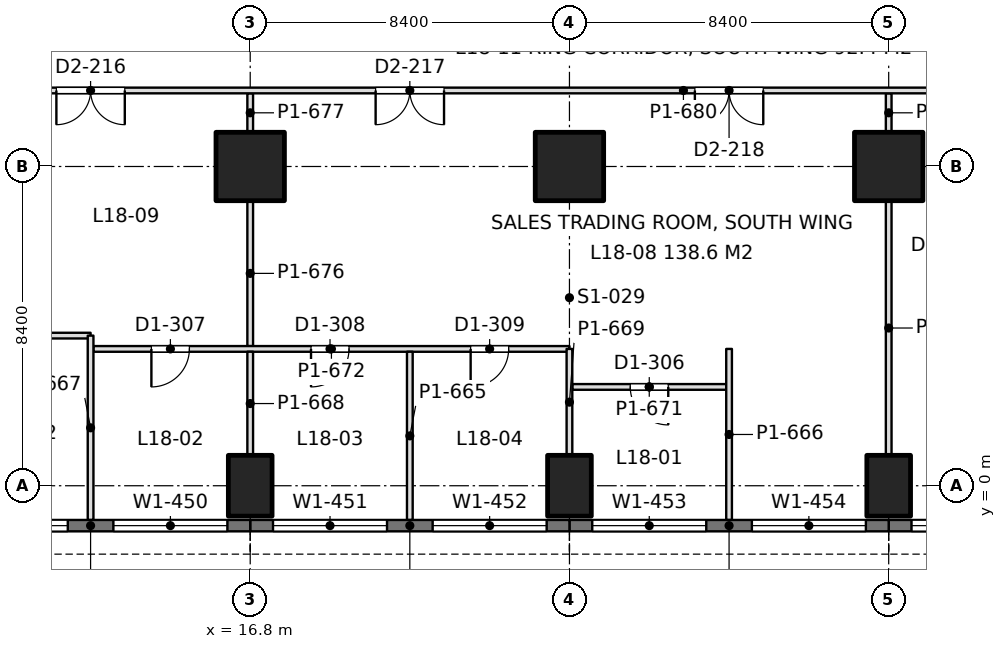
"""IFC4 building model, lengths in metres.
Left out: names, types, materials, properties, quantities, classifications, styles, units other than length and angle.
Written with IfcOpenShell. Run it as: python <this file> out.ifc"""

import sys

from ifc_helpers import new_model, si_unit, direction, frame, frame_2d, origin, origin_2d, place, context, subcontext, project, spatial, rectangle, extrude, element, fill, save


model = new_model("IFC4")
c1 = context("Model", 3, precision=1e-05, world=origin(), true_north=direction((0.0, 1.0)))
c2 = subcontext(c1, "Body", "Model", "MODEL_VIEW")
j1 = project(units=[si_unit("LENGTHUNIT", "METRE"), si_unit("PLANEANGLEUNIT", "RADIAN")], contexts=[c1])
p1 = place(None, origin())
s1 = spatial("IfcSite", under=j1, at=p1, CompositionType="ELEMENT")
p2 = place(p1, origin())
s2 = spatial("IfcBuilding", under=s1, at=p2, CompositionType="ELEMENT")
p3 = place(p2, frame((0.0, 0.0, 81.9)))
s3 = spatial("IfcBuildingStorey", under=s2, at=p3, CompositionType="ELEMENT", Elevation=81.9)
p4 = place(p3, frame((16.8, 0.0, 0.0), z_axis=(0.0, 0.0, 1.0), x_axis=(1.0, 0.0, 0.0)))
e1 = element("IfcColumn", 1, at=p4, inside=s3, PredefinedType="COLUMN", context=c2, shape_type="SweptSolid", body=[
    extrude(rectangle(XDim=1.15, YDim=1.6, at=origin_2d()), origin(), (0.0, 0.0, 1.0), 4.5),
])
p5 = place(p3, frame((16.8, 8.4, 0.0), z_axis=(0.0, 0.0, 1.0), x_axis=(1.0, 0.0, 0.0)))
e2 = element("IfcColumn", 2, at=p5, inside=s3, PredefinedType="COLUMN", context=c2, shape_type="SweptSolid", body=[
    extrude(rectangle(XDim=1.8, YDim=1.8, at=origin_2d()), origin(), (0.0, 0.0, 1.0), 4.5),
])
p6 = place(p3, frame((25.2, 0.0, 0.0), z_axis=(0.0, 0.0, 1.0), x_axis=(1.0, 0.0, 0.0)))
e3 = element("IfcColumn", 3, at=p6, inside=s3, PredefinedType="COLUMN", context=c2, shape_type="SweptSolid", body=[
    extrude(rectangle(XDim=1.15, YDim=1.6, at=origin_2d()), origin(), (0.0, 0.0, 1.0), 4.5),
])
p7 = place(p3, frame((25.2, 8.4, 0.0), z_axis=(0.0, 0.0, 1.0), x_axis=(1.0, 0.0, 0.0)))
e4 = element("IfcColumn", 4, at=p7, inside=s3, PredefinedType="COLUMN", context=c2, shape_type="SweptSolid", body=[
    extrude(rectangle(XDim=1.8, YDim=1.8, at=origin_2d()), origin(), (0.0, 0.0, 1.0), 4.5),
])
p8 = place(p3, frame((33.6, 0.0, 0.0), z_axis=(0.0, 0.0, 1.0), x_axis=(1.0, 0.0, 0.0)))
e5 = element("IfcColumn", 5, at=p8, inside=s3, PredefinedType="COLUMN", context=c2, shape_type="SweptSolid", body=[
    extrude(rectangle(XDim=1.15, YDim=1.6, at=origin_2d()), origin(), (0.0, 0.0, 1.0), 4.5),
])
p9 = place(p3, frame((33.6, 8.4, 0.0), z_axis=(0.0, 0.0, 1.0), x_axis=(1.0, 0.0, 0.0)))
e6 = element("IfcColumn", 6, at=p9, inside=s3, PredefinedType="COLUMN", context=c2, shape_type="SweptSolid", body=[
    extrude(rectangle(XDim=1.8, YDim=1.8, at=origin_2d()), origin(), (0.0, 0.0, 1.0), 4.5),
])
p10 = place(p3, frame((42.0, -1.05, 0.0), z_axis=(0.0, 0.0, 1.0), x_axis=(-1.0, 0.0, 0.0)))
e7 = element("IfcWall", 7, at=p10, inside=s3, PredefinedType="SOLIDWALL", context=c2, shape_type="SweptSolid", body=[
    extrude(rectangle(XDim=8.4, YDim=0.3, at=frame_2d((4.2, 0.0))), origin(), (0.0, 0.0, 1.0), 4.34),
])
p11 = place(p10, frame((0.6, 0.0, 0.9)))
e8 = element("IfcOpeningElement", 8, at=p11, cuts=e7, PredefinedType="OPENING", context=c2, shape_type="SweptSolid", body=[
    extrude(rectangle(XDim=3.0, YDim=1.9, at=frame_2d((1.5, 0.95))), frame((0.0, 0.16, 0.0), z_axis=(0.0, -1.0, 0.0), x_axis=(1.0, 0.0, 0.0)), (0.0, 0.0, 1.0), 0.32),
])
p12 = place(p10, frame((4.8, 0.0, 0.9)))
e9 = element("IfcOpeningElement", 9, at=p12, cuts=e7, PredefinedType="OPENING", context=c2, shape_type="SweptSolid", body=[
    extrude(rectangle(XDim=3.0, YDim=1.9, at=frame_2d((1.5, 0.95))), frame((0.0, 0.16, 0.0), z_axis=(0.0, -1.0, 0.0), x_axis=(1.0, 0.0, 0.0)), (0.0, 0.0, 1.0), 0.32),
])
p13 = place(p3, frame((33.6, -1.05, 0.0), z_axis=(0.0, 0.0, 1.0), x_axis=(-1.0, 0.0, 0.0)))
e10 = element("IfcWall", 10, at=p13, inside=s3, PredefinedType="SOLIDWALL", context=c2, shape_type="SweptSolid", body=[
    extrude(rectangle(XDim=8.4, YDim=0.3, at=frame_2d((4.2, 0.0))), origin(), (0.0, 0.0, 1.0), 4.34),
])
p14 = place(p13, frame((0.6, 0.0, 0.9)))
e11 = element("IfcOpeningElement", 11, at=p14, cuts=e10, PredefinedType="OPENING", context=c2, shape_type="SweptSolid", body=[
    extrude(rectangle(XDim=3.0, YDim=1.9, at=frame_2d((1.5, 0.95))), frame((0.0, 0.16, 0.0), z_axis=(0.0, -1.0, 0.0), x_axis=(1.0, 0.0, 0.0)), (0.0, 0.0, 1.0), 0.32),
])
p15 = place(p13, frame((4.8, 0.0, 0.9)))
e12 = element("IfcOpeningElement", 12, at=p15, cuts=e10, PredefinedType="OPENING", context=c2, shape_type="SweptSolid", body=[
    extrude(rectangle(XDim=3.0, YDim=1.9, at=frame_2d((1.5, 0.95))), frame((0.0, 0.16, 0.0), z_axis=(0.0, -1.0, 0.0), x_axis=(1.0, 0.0, 0.0)), (0.0, 0.0, 1.0), 0.32),
])
p16 = place(p3, frame((25.2, -1.05, 0.0), z_axis=(0.0, 0.0, 1.0), x_axis=(-1.0, 0.0, 0.0)))
e13 = element("IfcWall", 13, at=p16, inside=s3, PredefinedType="SOLIDWALL", context=c2, shape_type="SweptSolid", body=[
    extrude(rectangle(XDim=8.4, YDim=0.3, at=frame_2d((4.2, 0.0))), origin(), (0.0, 0.0, 1.0), 4.34),
])
p17 = place(p16, frame((0.6, 0.0, 0.9)))
e14 = element("IfcOpeningElement", 14, at=p17, cuts=e13, PredefinedType="OPENING", context=c2, shape_type="SweptSolid", body=[
    extrude(rectangle(XDim=3.0, YDim=1.9, at=frame_2d((1.5, 0.95))), frame((0.0, 0.16, 0.0), z_axis=(0.0, -1.0, 0.0), x_axis=(1.0, 0.0, 0.0)), (0.0, 0.0, 1.0), 0.32),
])
p18 = place(p16, frame((4.8, 0.0, 0.9)))
e15 = element("IfcOpeningElement", 15, at=p18, cuts=e13, PredefinedType="OPENING", context=c2, shape_type="SweptSolid", body=[
    extrude(rectangle(XDim=3.0, YDim=1.9, at=frame_2d((1.5, 0.95))), frame((0.0, 0.16, 0.0), z_axis=(0.0, -1.0, 0.0), x_axis=(1.0, 0.0, 0.0)), (0.0, 0.0, 1.0), 0.32),
])
p19 = place(p3, frame((16.8, -1.05, 0.0), z_axis=(0.0, 0.0, 1.0), x_axis=(-1.0, 0.0, 0.0)))
e16 = element("IfcWall", 16, at=p19, inside=s3, PredefinedType="SOLIDWALL", context=c2, shape_type="SweptSolid", body=[
    extrude(rectangle(XDim=8.4, YDim=0.3, at=frame_2d((4.2, 0.0))), origin(), (0.0, 0.0, 1.0), 4.34),
])
p20 = place(p19, frame((0.6, 0.0, 0.9)))
e17 = element("IfcOpeningElement", 17, at=p20, cuts=e16, PredefinedType="OPENING", context=c2, shape_type="SweptSolid", body=[
    extrude(rectangle(XDim=3.0, YDim=1.9, at=frame_2d((1.5, 0.95))), frame((0.0, 0.16, 0.0), z_axis=(0.0, -1.0, 0.0), x_axis=(1.0, 0.0, 0.0)), (0.0, 0.0, 1.0), 0.32),
])
p21 = place(p19, frame((4.8, 0.0, 0.9)))
e18 = element("IfcOpeningElement", 18, at=p21, cuts=e16, PredefinedType="OPENING", context=c2, shape_type="SweptSolid", body=[
    extrude(rectangle(XDim=3.0, YDim=1.9, at=frame_2d((1.5, 0.95))), frame((0.0, 0.16, 0.0), z_axis=(0.0, -1.0, 0.0), x_axis=(1.0, 0.0, 0.0)), (0.0, 0.0, 1.0), 0.32),
])
p22 = place(p3, frame((-0.902, 3.95, 0.0), z_axis=(0.0, 0.0, 1.0), x_axis=(1.0, 0.0, 0.0)))
e19 = element("IfcWall", 19, at=p22, inside=s3, PredefinedType="PARTITIONING", context=c2, shape_type="SweptSolid", body=[
    extrude(rectangle(XDim=13.502, YDim=0.15, at=frame_2d((6.751, 0.0))), origin(), (0.0, 0.0, 1.0), 3.74),
])
p23 = place(p22, frame((5.852, 0.0, 0.0)))
e20 = element("IfcOpeningElement", 20, at=p23, cuts=e19, PredefinedType="OPENING", context=c2, shape_type="SweptSolid", body=[
    extrude(rectangle(XDim=1.8, YDim=2.2, at=frame_2d((0.9, 1.1))), frame((0.0, 0.085, 0.0), z_axis=(0.0, -1.0, 0.0), x_axis=(1.0, 0.0, 0.0)), (0.0, 0.0, 1.0), 0.17),
])
p24 = place(p3, frame((25.274, 2.6, 0.0), z_axis=(0.0, 0.0, 1.0), x_axis=(1.0, 0.0, 0.0)))
e21 = element("IfcWall", 21, at=p24, inside=s3, PredefinedType="PARTITIONING", context=c2, shape_type="SweptSolid", body=[
    extrude(rectangle(XDim=4.052, YDim=0.15, at=frame_2d((2.026, 0.0))), origin(), (0.0, 0.0, 1.0), 3.74),
])
p25 = place(p24, frame((1.526, 0.0, 0.0)))
e22 = element("IfcOpeningElement", 22, at=p25, cuts=e21, PredefinedType="OPENING", context=c2, shape_type="SweptSolid", body=[
    extrude(rectangle(XDim=1.0, YDim=2.2, at=frame_2d((0.5, 1.1))), frame((0.0, 0.085, 0.0), z_axis=(0.0, -1.0, 0.0), x_axis=(1.0, 0.0, 0.0)), (0.0, 0.0, 1.0), 0.17),
])
p26 = place(p3, frame((12.674, 3.6, 0.0), z_axis=(0.0, 0.0, 1.0), x_axis=(1.0, 0.0, 0.0)))
e23 = element("IfcWall", 23, at=p26, inside=s3, PredefinedType="PARTITIONING", context=c2, shape_type="SweptSolid", body=[
    extrude(rectangle(XDim=12.526, YDim=0.15, at=frame_2d((6.263, 0.0))), origin(), (0.0, 0.0, 1.0), 3.74),
])
p27 = place(p26, frame((1.526, 0.0, 0.0)))
e24 = element("IfcOpeningElement", 24, at=p27, cuts=e23, PredefinedType="OPENING", context=c2, shape_type="SweptSolid", body=[
    extrude(rectangle(XDim=1.0, YDim=2.2, at=frame_2d((0.5, 1.1))), frame((0.0, 0.085, 0.0), z_axis=(0.0, -1.0, 0.0), x_axis=(1.0, 0.0, 0.0)), (0.0, 0.0, 1.0), 0.17),
])
p28 = place(p26, frame((5.726, 0.0, 0.0)))
e25 = element("IfcOpeningElement", 25, at=p28, cuts=e23, PredefinedType="OPENING", context=c2, shape_type="SweptSolid", body=[
    extrude(rectangle(XDim=1.0, YDim=2.2, at=frame_2d((0.5, 1.1))), frame((0.0, 0.085, 0.0), z_axis=(0.0, -1.0, 0.0), x_axis=(1.0, 0.0, 0.0)), (0.0, 0.0, 1.0), 0.17),
])
p29 = place(p26, frame((9.926, 0.0, 0.0)))
e26 = element("IfcOpeningElement", 26, at=p29, cuts=e23, PredefinedType="OPENING", context=c2, shape_type="SweptSolid", body=[
    extrude(rectangle(XDim=1.0, YDim=2.2, at=frame_2d((0.5, 1.1))), frame((0.0, 0.085, 0.0), z_axis=(0.0, -1.0, 0.0), x_axis=(1.0, 0.0, 0.0)), (0.0, 0.0, 1.0), 0.17),
])
p30 = place(p3, frame((12.6, -0.902, 0.0), z_axis=(0.0, 0.0, 1.0), x_axis=(0.0, 1.0, 0.0)))
e27 = element("IfcWall", 27, at=p30, inside=s3, PredefinedType="PARTITIONING", context=c2, shape_type="SweptSolid", body=[
    extrude(rectangle(XDim=4.852, YDim=0.15, at=frame_2d((2.426, 0.0))), origin(), (0.0, 0.0, 1.0), 3.84),
])
p31 = place(p3, frame((16.8, 0.799, 0.0), z_axis=(0.0, 0.0, 1.0), x_axis=(0.0, 1.0, 0.0)))
e28 = element("IfcWall", 28, at=p31, inside=s3, PredefinedType="PARTITIONING", context=c2, shape_type="SweptSolid", body=[
    extrude(rectangle(XDim=2.727, YDim=0.15, at=frame_2d((1.363, 0.0))), origin(), (0.0, 0.0, 1.0), 3.74),
])
p32 = place(p3, frame((21.0, -0.902, 0.0), z_axis=(0.0, 0.0, 1.0), x_axis=(0.0, 1.0, 0.0)))
e29 = element("IfcWall", 29, at=p32, inside=s3, PredefinedType="PARTITIONING", context=c2, shape_type="SweptSolid", body=[
    extrude(rectangle(XDim=4.428, YDim=0.15, at=frame_2d((2.214, 0.0))), origin(), (0.0, 0.0, 1.0), 3.84),
])
p33 = place(p3, frame((25.2, 0.799, 0.0), z_axis=(0.0, 0.0, 1.0), x_axis=(0.0, 1.0, 0.0)))
e30 = element("IfcWall", 30, at=p33, inside=s3, PredefinedType="PARTITIONING", context=c2, shape_type="SweptSolid", body=[
    extrude(rectangle(XDim=2.801, YDim=0.15, at=frame_2d((1.4, 0.0))), origin(), (0.0, 0.0, 1.0), 3.74),
])
p34 = place(p3, frame((29.4, -0.902, 0.0), z_axis=(0.0, 0.0, 1.0), x_axis=(0.0, 1.0, 0.0)))
e31 = element("IfcWall", 31, at=p34, inside=s3, PredefinedType="PARTITIONING", context=c2, shape_type="SweptSolid", body=[
    extrude(rectangle(XDim=4.502, YDim=0.15, at=frame_2d((2.251, 0.0))), origin(), (0.0, 0.0, 1.0), 3.84),
])
p35 = place(p3, frame((16.8, 3.674, 0.0), z_axis=(0.0, 0.0, 1.0), x_axis=(0.0, 1.0, 0.0)))
e32 = element("IfcWall", 32, at=p35, inside=s3, PredefinedType="PARTITIONING", context=c2, shape_type="SweptSolid", body=[
    extrude(rectangle(XDim=3.827, YDim=0.15, at=frame_2d((1.914, 0.0))), origin(), (0.0, 0.0, 1.0), 3.74),
])
p36 = place(p3, frame((16.8, 9.299, 0.0), z_axis=(0.0, 0.0, 1.0), x_axis=(0.0, 1.0, 0.0)))
e33 = element("IfcWall", 33, at=p36, inside=s3, PredefinedType="PARTITIONING", context=c2, shape_type="SweptSolid", body=[
    extrude(rectangle(XDim=1.027, YDim=0.15, at=frame_2d((0.513, 0.0))), origin(), (0.0, 0.0, 1.0), 3.98),
])
p37 = place(p3, frame((33.6, 0.799, 0.0), z_axis=(0.0, 0.0, 1.0), x_axis=(0.0, 1.0, 0.0)))
e34 = element("IfcWall", 34, at=p37, inside=s3, PredefinedType="PARTITIONING", context=c2, shape_type="SweptSolid", body=[
    extrude(rectangle(XDim=6.702, YDim=0.15, at=frame_2d((3.351, 0.0))), origin(), (0.0, 0.0, 1.0), 3.74),
])
p38 = place(p3, frame((33.6, 9.299, 0.0), z_axis=(0.0, 0.0, 1.0), x_axis=(0.0, 1.0, 0.0)))
e35 = element("IfcWall", 35, at=p38, inside=s3, PredefinedType="PARTITIONING", context=c2, shape_type="SweptSolid", body=[
    extrude(rectangle(XDim=1.027, YDim=0.15, at=frame_2d((0.513, 0.0))), origin(), (0.0, 0.0, 1.0), 3.98),
])
p39 = place(p3, frame((7.198, 10.4, 0.0), z_axis=(0.0, 0.0, 1.0), x_axis=(1.0, 0.0, 0.0)))
e36 = element("IfcWall", 36, at=p39, inside=s3, PredefinedType="PARTITIONING", context=c2, shape_type="SweptSolid", body=[
    extrude(rectangle(XDim=42.002, YDim=0.15, at=frame_2d((21.001, 0.0))), origin(), (0.0, 0.0, 1.0), 3.74),
])
p40 = place(p39, frame((4.502, 0.0, 0.0)))
e37 = element("IfcOpeningElement", 37, at=p40, cuts=e36, PredefinedType="OPENING", context=c2, shape_type="SweptSolid", body=[
    extrude(rectangle(XDim=1.8, YDim=2.2, at=frame_2d((0.9, 1.1))), frame((0.0, 0.085, 0.0), z_axis=(0.0, -1.0, 0.0), x_axis=(1.0, 0.0, 0.0)), (0.0, 0.0, 1.0), 0.17),
])
p41 = place(p39, frame((12.902, 0.0, 0.0)))
e38 = element("IfcOpeningElement", 38, at=p41, cuts=e36, PredefinedType="OPENING", context=c2, shape_type="SweptSolid", body=[
    extrude(rectangle(XDim=1.8, YDim=2.2, at=frame_2d((0.9, 1.1))), frame((0.0, 0.085, 0.0), z_axis=(0.0, -1.0, 0.0), x_axis=(1.0, 0.0, 0.0)), (0.0, 0.0, 1.0), 0.17),
])
p42 = place(p39, frame((21.302, 0.0, 0.0)))
e39 = element("IfcOpeningElement", 39, at=p42, cuts=e36, PredefinedType="OPENING", context=c2, shape_type="SweptSolid", body=[
    extrude(rectangle(XDim=1.8, YDim=2.2, at=frame_2d((0.9, 1.1))), frame((0.0, 0.085, 0.0), z_axis=(0.0, -1.0, 0.0), x_axis=(1.0, 0.0, 0.0)), (0.0, 0.0, 1.0), 0.17),
])
p43 = place(p39, frame((29.702, 0.0, 0.0)))
e40 = element("IfcOpeningElement", 40, at=p43, cuts=e36, PredefinedType="OPENING", context=c2, shape_type="SweptSolid", body=[
    extrude(rectangle(XDim=1.8, YDim=2.2, at=frame_2d((0.9, 1.1))), frame((0.0, 0.085, 0.0), z_axis=(0.0, -1.0, 0.0), x_axis=(1.0, 0.0, 0.0)), (0.0, 0.0, 1.0), 0.17),
])
p44 = place(p39, frame((38.102, 0.0, 0.0)))
e41 = element("IfcOpeningElement", 41, at=p44, cuts=e36, PredefinedType="OPENING", context=c2, shape_type="SweptSolid", body=[
    extrude(rectangle(XDim=1.8, YDim=2.2, at=frame_2d((0.9, 1.1))), frame((0.0, 0.085, 0.0), z_axis=(0.0, -1.0, 0.0), x_axis=(1.0, 0.0, 0.0)), (0.0, 0.0, 1.0), 0.17),
])
p45 = place(p12, origin())
e42 = element("IfcWindow", 42, at=p45, inside=s3, PartitioningType="SINGLE_PANEL", PredefinedType="WINDOW", context=c2, shape_type="SweptSolid", body=[
    extrude(rectangle(XDim=3.0, YDim=1.9, at=frame_2d((1.5, 0.95))), frame((0.0, 0.03, 0.0), z_axis=(0.0, -1.0, 0.0), x_axis=(1.0, 0.0, 0.0)), (0.0, 0.0, 1.0), 0.06),
])
fill(e9, e42)
p46 = place(p14, origin())
e43 = element("IfcWindow", 43, at=p46, inside=s3, PartitioningType="SINGLE_PANEL", PredefinedType="WINDOW", context=c2, shape_type="SweptSolid", body=[
    extrude(rectangle(XDim=3.0, YDim=1.9, at=frame_2d((1.5, 0.95))), frame((0.0, 0.03, 0.0), z_axis=(0.0, -1.0, 0.0), x_axis=(1.0, 0.0, 0.0)), (0.0, 0.0, 1.0), 0.06),
])
fill(e11, e43)
p47 = place(p15, origin())
e44 = element("IfcWindow", 44, at=p47, inside=s3, PartitioningType="SINGLE_PANEL", PredefinedType="WINDOW", context=c2, shape_type="SweptSolid", body=[
    extrude(rectangle(XDim=3.0, YDim=1.9, at=frame_2d((1.5, 0.95))), frame((0.0, 0.03, 0.0), z_axis=(0.0, -1.0, 0.0), x_axis=(1.0, 0.0, 0.0)), (0.0, 0.0, 1.0), 0.06),
])
fill(e12, e44)
p48 = place(p17, origin())
e45 = element("IfcWindow", 45, at=p48, inside=s3, PartitioningType="SINGLE_PANEL", PredefinedType="WINDOW", context=c2, shape_type="SweptSolid", body=[
    extrude(rectangle(XDim=3.0, YDim=1.9, at=frame_2d((1.5, 0.95))), frame((0.0, 0.03, 0.0), z_axis=(0.0, -1.0, 0.0), x_axis=(1.0, 0.0, 0.0)), (0.0, 0.0, 1.0), 0.06),
])
fill(e14, e45)
p49 = place(p18, origin())
e46 = element("IfcWindow", 46, at=p49, inside=s3, PartitioningType="SINGLE_PANEL", PredefinedType="WINDOW", context=c2, shape_type="SweptSolid", body=[
    extrude(rectangle(XDim=3.0, YDim=1.9, at=frame_2d((1.5, 0.95))), frame((0.0, 0.03, 0.0), z_axis=(0.0, -1.0, 0.0), x_axis=(1.0, 0.0, 0.0)), (0.0, 0.0, 1.0), 0.06),
])
fill(e15, e46)
p50 = place(p20, origin())
e47 = element("IfcWindow", 47, at=p50, inside=s3, PartitioningType="SINGLE_PANEL", PredefinedType="WINDOW", context=c2, shape_type="SweptSolid", body=[
    extrude(rectangle(XDim=3.0, YDim=1.9, at=frame_2d((1.5, 0.95))), frame((0.0, 0.03, 0.0), z_axis=(0.0, -1.0, 0.0), x_axis=(1.0, 0.0, 0.0)), (0.0, 0.0, 1.0), 0.06),
])
fill(e17, e47)
p51 = place(p21, origin())
e48 = element("IfcWindow", 48, at=p51, inside=s3, PartitioningType="SINGLE_PANEL", PredefinedType="WINDOW", context=c2, shape_type="SweptSolid", body=[
    extrude(rectangle(XDim=3.0, YDim=1.9, at=frame_2d((1.5, 0.95))), frame((0.0, 0.03, 0.0), z_axis=(0.0, -1.0, 0.0), x_axis=(1.0, 0.0, 0.0)), (0.0, 0.0, 1.0), 0.06),
])
fill(e18, e48)
p52 = place(p25, frame((1.0, 0.0, 0.0), z_axis=(0.0, 0.0, 1.0), x_axis=(-1.0, 0.0, 0.0)))
e49 = element("IfcDoor", 49, at=p52, inside=s3, OperationType="SINGLE_SWING_LEFT", PredefinedType="DOOR", context=c2, shape_type="SweptSolid", body=[
    extrude(rectangle(XDim=1.0, YDim=2.2, at=frame_2d((0.5, 1.1))), frame((0.0, 0.025, 0.0), z_axis=(0.0, -1.0, 0.0), x_axis=(1.0, 0.0, 0.0)), (0.0, 0.0, 1.0), 0.05),
])
fill(e22, e49)
p53 = place(p27, frame((1.0, 0.0, 0.0), z_axis=(0.0, 0.0, 1.0), x_axis=(-1.0, 0.0, 0.0)))
e50 = element("IfcDoor", 50, at=p53, inside=s3, OperationType="SINGLE_SWING_RIGHT", PredefinedType="DOOR", context=c2, shape_type="SweptSolid", body=[
    extrude(rectangle(XDim=1.0, YDim=2.2, at=frame_2d((0.5, 1.1))), frame((0.0, 0.025, 0.0), z_axis=(0.0, -1.0, 0.0), x_axis=(1.0, 0.0, 0.0)), (0.0, 0.0, 1.0), 0.05),
])
fill(e24, e50)
p54 = place(p28, frame((1.0, 0.0, 0.0), z_axis=(0.0, 0.0, 1.0), x_axis=(-1.0, 0.0, 0.0)))
e51 = element("IfcDoor", 51, at=p54, inside=s3, OperationType="SINGLE_SWING_RIGHT", PredefinedType="DOOR", context=c2, shape_type="SweptSolid", body=[
    extrude(rectangle(XDim=1.0, YDim=2.2, at=frame_2d((0.5, 1.1))), frame((0.0, 0.025, 0.0), z_axis=(0.0, -1.0, 0.0), x_axis=(1.0, 0.0, 0.0)), (0.0, 0.0, 1.0), 0.05),
])
fill(e25, e51)
p55 = place(p29, frame((1.0, 0.0, 0.0), z_axis=(0.0, 0.0, 1.0), x_axis=(-1.0, 0.0, 0.0)))
e52 = element("IfcDoor", 52, at=p55, inside=s3, OperationType="SINGLE_SWING_RIGHT", PredefinedType="DOOR", context=c2, shape_type="SweptSolid", body=[
    extrude(rectangle(XDim=1.0, YDim=2.2, at=frame_2d((0.5, 1.1))), frame((0.0, 0.025, 0.0), z_axis=(0.0, -1.0, 0.0), x_axis=(1.0, 0.0, 0.0)), (0.0, 0.0, 1.0), 0.05),
])
fill(e26, e52)
p56 = place(p40, frame((1.8, 0.0, 0.0), z_axis=(0.0, 0.0, 1.0), x_axis=(-1.0, 0.0, 0.0)))
e53 = element("IfcDoor", 53, at=p56, inside=s3, OperationType="DOUBLE_DOOR_SINGLE_SWING", PredefinedType="DOOR", context=c2, shape_type="SweptSolid", body=[
    extrude(rectangle(XDim=1.8, YDim=2.2, at=frame_2d((0.9, 1.1))), frame((0.0, 0.025, 0.0), z_axis=(0.0, -1.0, 0.0), x_axis=(1.0, 0.0, 0.0)), (0.0, 0.0, 1.0), 0.05),
])
fill(e37, e53)
p57 = place(p41, frame((1.8, 0.0, 0.0), z_axis=(0.0, 0.0, 1.0), x_axis=(-1.0, 0.0, 0.0)))
e54 = element("IfcDoor", 54, at=p57, inside=s3, OperationType="DOUBLE_DOOR_SINGLE_SWING", PredefinedType="DOOR", context=c2, shape_type="SweptSolid", body=[
    extrude(rectangle(XDim=1.8, YDim=2.2, at=frame_2d((0.9, 1.1))), frame((0.0, 0.025, 0.0), z_axis=(0.0, -1.0, 0.0), x_axis=(1.0, 0.0, 0.0)), (0.0, 0.0, 1.0), 0.05),
])
fill(e38, e54)
p58 = place(p42, frame((1.8, 0.0, 0.0), z_axis=(0.0, 0.0, 1.0), x_axis=(-1.0, 0.0, 0.0)))
e55 = element("IfcDoor", 55, at=p58, inside=s3, OperationType="DOUBLE_DOOR_SINGLE_SWING", PredefinedType="DOOR", context=c2, shape_type="SweptSolid", body=[
    extrude(rectangle(XDim=1.8, YDim=2.2, at=frame_2d((0.9, 1.1))), frame((0.0, 0.025, 0.0), z_axis=(0.0, -1.0, 0.0), x_axis=(1.0, 0.0, 0.0)), (0.0, 0.0, 1.0), 0.05),
])
fill(e39, e55)
save(model, sys.argv[1])
